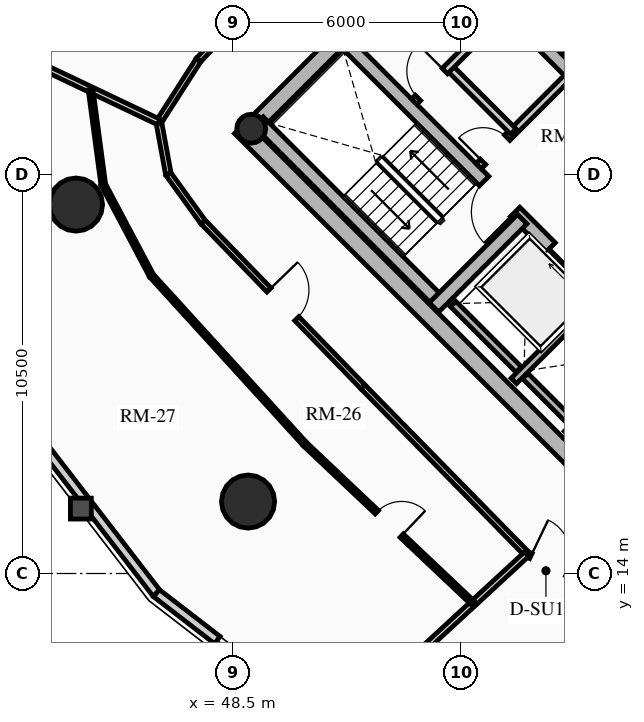
"""IFC4 building model, lengths in metres.
Left out: names, types, materials, properties, quantities, classifications, styles, units other than length and angle.
Written with IfcOpenShell. Run it as: python <this file> out.ifc"""

import sys

from ifc_helpers import new_model, si_unit, direction, frame, frame_2d, origin, origin_2d, place, context, subcontext, project, spatial, rectangle, circle, hollow_circle, extrude, source, transform, mapped, element, fill, save


model = new_model("IFC4")
c1 = context("Model", 3, precision=1e-05, world=origin(), true_north=direction((0.0, 1.0)))
c2 = subcontext(c1, "Body", "Model", "MODEL_VIEW")
j1 = project(units=[si_unit("LENGTHUNIT", "METRE"), si_unit("PLANEANGLEUNIT", "RADIAN")], contexts=[c1])
p1 = place(None, origin())
s1 = spatial("IfcSite", under=j1, at=p1, CompositionType="ELEMENT")
p2 = place(p1, origin())
s2 = spatial("IfcBuilding", under=s1, at=p2, CompositionType="ELEMENT")
p3 = place(p2, frame((0.0, 0.0, 113.8)))
s3 = spatial("IfcBuildingStorey", under=s2, at=p3, CompositionType="ELEMENT", Elevation=113.8)
for number, where, z_axis, x_axis in (
    (1, (58.737, 15.697, 0.0), (0.0, 0.0, 1.0), (-0.707, 0.707, 0.0)),
    (2, (66.303, 23.263, 0.0), (0.0, 0.0, 1.0), (-0.707, 0.707, 0.0)),
):
    element("IfcWall", number, at=place(p3, frame(where, z_axis=z_axis, x_axis=x_axis)), inside=s3, PredefinedType="SHEAR", context=c2, shape_type="SweptSolid", body=[
        extrude(rectangle(XDim=14.2, YDim=0.45, at=frame_2d((7.1, 0.0))), origin(), (0.0, 0.0, 1.0), 2.91),
    ])
p4 = place(p3, frame((48.856, 25.578, 0.0), z_axis=(0.0, 0.0, 1.0), x_axis=(0.707106781187, 0.707106781187, 0.0)))
e3 = element("IfcWall", 3, at=p4, inside=s3, PredefinedType="SHEAR", context=c2, shape_type="SweptSolid", body=[
    extrude(rectangle(XDim=10.7, YDim=0.45, at=frame_2d((5.35, 0.0))), origin(), (0.0, 0.0, 1.0), 2.91),
])
m1 = source(origin(), c2, "Body", "SweptSolid", [
    extrude(rectangle(XDim=1.5, YDim=2.02, at=frame_2d((0.75, 1.01))), frame((0.0, 0.235, 0.0), z_axis=(0.0, -1.0, 0.0), x_axis=(1.0, 0.0, 0.0)), (0.0, 0.0, 1.0), 0.47),
])
p5 = place(p4, frame((4.6, 0.0, 0.0)))
e4 = element("IfcOpeningElement", 4, at=p5, cuts=e3, PredefinedType="OPENING", context=c2, shape_type="MappedRepresentation", body=[
    mapped(m1, transform((0.0, 0.0, 0.0), x_axis=(1.0, 0.0, 0.0), y_axis=(0.0, 1.0, 0.0), z_axis=(0.0, 0.0, 1.0), scale=1.0)),
])
p6 = place(p3, frame((61.078, 18.355, 0.0), z_axis=(0.0, 0.0, 1.0), x_axis=(-0.707106781187, 0.707106781187, 0.0)))
e5 = element("IfcWall", 5, at=p6, inside=s3, PredefinedType="SHEAR", context=c2, shape_type="SweptSolid", body=[
    extrude(rectangle(XDim=13.75, YDim=0.35, at=frame_2d((6.875, 0.0))), origin(), (0.0, 0.0, 1.0), 2.91),
])
m2 = source(origin(), c2, "Body", "SweptSolid", [
    extrude(rectangle(XDim=1.1, YDim=2.015, at=frame_2d((0.55, 1.007))), frame((0.0, 0.185, 0.0), z_axis=(0.0, -1.0, 0.0), x_axis=(1.0, 0.0, 0.0)), (0.0, 0.0, 1.0), 0.37),
])
p7 = place(p6, frame((4.875, 0.0, 0.0)))
e6 = element("IfcOpeningElement", 6, at=p7, cuts=e5, PredefinedType="OPENING", context=c2, shape_type="MappedRepresentation", body=[
    mapped(m2, transform((0.0, 0.0, 0.0), x_axis=(1.0, 0.0, 0.0), y_axis=(0.0, 1.0, 0.0), z_axis=(0.0, 0.0, 1.0), scale=1.0)),
])
m3 = source(origin(), c2, "Body", "SweptSolid", [
    extrude(rectangle(XDim=1.15, YDim=2.02, at=frame_2d((0.575, 1.01))), frame((0.0, 0.185, 0.0), z_axis=(0.0, -1.0, 0.0), x_axis=(1.0, 0.0, 0.0)), (0.0, 0.0, 1.0), 0.37),
])
p8 = place(p6, frame((7.295, 0.0, 0.0)))
e7 = element("IfcOpeningElement", 7, at=p8, cuts=e5, PredefinedType="OPENING", context=c2, shape_type="MappedRepresentation", body=[
    mapped(m3, transform((0.0, 0.0, 0.0), x_axis=(1.0, 0.0, 0.0), y_axis=(0.0, 1.0, 0.0), z_axis=(0.0, 0.0, 1.0), scale=1.0)),
])
p9 = place(p3, frame((63.645, 20.922, 0.0), z_axis=(0.0, 0.0, 1.0), x_axis=(-0.707106781187, 0.707106781187, 0.0)))
e8 = element("IfcWall", 8, at=p9, inside=s3, PredefinedType="SHEAR", context=c2, shape_type="SweptSolid", body=[
    extrude(rectangle(XDim=13.75, YDim=0.35, at=frame_2d((6.875, 0.0))), origin(), (0.0, 0.0, 1.0), 2.91),
])
p10 = place(p9, frame((10.0, 0.0, 0.0)))
e9 = element("IfcOpeningElement", 9, at=p10, cuts=e8, PredefinedType="OPENING", context=c2, shape_type="MappedRepresentation", body=[
    mapped(m2, transform((0.0, 0.0, 0.0), x_axis=(1.0, 0.0, 0.0), y_axis=(0.0, 1.0, 0.0), z_axis=(0.0, 0.0, 1.0), scale=1.0)),
])
p11 = place(p9, frame((12.0, 0.0, 0.0)))
e10 = element("IfcOpeningElement", 10, at=p11, cuts=e8, PredefinedType="OPENING", context=c2, shape_type="MappedRepresentation", body=[
    mapped(m2, transform((0.0, 0.0, 0.0), x_axis=(1.0, 0.0, 0.0), y_axis=(0.0, 1.0, 0.0), z_axis=(0.0, 0.0, 1.0), scale=1.0)),
])
p12 = place(p9, frame((5.305, 0.0, 0.0)))
e11 = element("IfcOpeningElement", 11, at=p12, cuts=e8, PredefinedType="OPENING", context=c2, shape_type="MappedRepresentation", body=[
    mapped(m3, transform((0.0, 0.0, 0.0), x_axis=(1.0, 0.0, 0.0), y_axis=(0.0, 1.0, 0.0), z_axis=(0.0, 0.0, 1.0), scale=1.0)),
])
p13 = place(p3, frame((53.922, 21.141, 0.0), z_axis=(0.0, 0.0, 1.0), x_axis=(-0.707088616009, 0.707124945897, 0.0)))
e12 = element("IfcWall", 12, at=p13, inside=s3, PredefinedType="SHEAR", context=c2, shape_type="SweptSolid", body=[
    extrude(rectangle(XDim=6.72, YDim=0.35, at=frame_2d((3.36, 0.0))), origin(), (0.0, 0.0, 1.0), 2.91),
])
p14 = place(p3, frame((53.784, 21.003, 0.0), z_axis=(0.0, 0.0, 1.0), x_axis=(0.707106781187, 0.707106781187, 0.0)))
e13 = element("IfcWall", 13, at=p14, inside=s3, PredefinedType="SHEAR", context=c2, shape_type="SweptSolid", body=[
    extrude(rectangle(XDim=3.285, YDim=0.35, at=frame_2d((1.643, 0.0))), origin(), (0.0, 0.0, 1.0), 2.91),
])
p15 = place(p3, frame((48.976, 25.706, 0.0), z_axis=(0.0, 0.0, 1.0), x_axis=(0.707106781187, 0.707106781187, 0.0)))
e14 = element("IfcColumn", 14, at=p15, inside=s3, PredefinedType="COLUMN", context=c2, shape_type="SweptSolid", body=[
    extrude(hollow_circle(Radius=0.38, WallThickness=0.032, at=origin_2d()), origin(), (0.0, 0.0, 1.0), 2.91),
])
for number, where, z_axis, x_axis in (
    (15, (44.365, 23.709, 0.0), (0.0, 0.0, 1.0), (1.0, 0.0, 0.0)),
    (16, (48.893, 15.893, 0.0), (0.0, 0.0, 1.0), (1.0, 0.0, 0.0)),
):
    element("IfcColumn", number, at=place(p3, frame(where, z_axis=z_axis, x_axis=x_axis)), inside=s3, PredefinedType="USERDEFINED", context=c2, shape_type="SweptSolid", body=[
        extrude(circle(Radius=0.7, at=origin_2d()), origin(), (0.0, 0.0, 1.0), 2.91),
    ])
p16 = place(p3, frame((46.483, 13.483, 0.0), z_axis=(0.0, 0.0, 1.0), x_axis=(-0.61054437102, 0.791982052206, 0.0)))
e17 = element("IfcWall", 17, at=p16, inside=s3, PredefinedType="SOLIDWALL", context=c2, shape_type="SweptSolid", body=[
    extrude(rectangle(XDim=5.942, YDim=0.24, at=frame_2d((2.971, 0.0))), origin(), (0.0, 0.0, 1.0), 2.179),
])
p17 = place(p3, frame((51.189, 9.855, 0.0), z_axis=(0.0, 0.0, 1.0), x_axis=(-0.791982052206, 0.61054437102, 0.0)))
e18 = element("IfcWall", 18, at=p17, inside=s3, PredefinedType="SOLIDWALL", context=c2, shape_type="SweptSolid", body=[
    extrude(rectangle(XDim=5.942, YDim=0.24, at=frame_2d((2.971, 0.0))), origin(), (0.0, 0.0, 1.0), 2.179),
])
m4 = source(origin(), c2, "Body", "SweptSolid", [
    extrude(rectangle(XDim=1.9, YDim=1.35, at=frame_2d((0.95, 0.675))), frame((0.0, 0.13, 0.0), z_axis=(0.0, -1.0, 0.0), x_axis=(1.0, 0.0, 0.0)), (0.0, 0.0, 1.0), 0.26),
])
p18 = place(p17, frame((2.021, 0.0, 0.65)))
e19 = element("IfcOpeningElement", 19, at=p18, cuts=e18, PredefinedType="OPENING", context=c2, shape_type="MappedRepresentation", body=[
    mapped(m4, transform((0.0, 0.0, 0.0), x_axis=(1.0, 0.0, 0.0), y_axis=(0.0, 1.0, 0.0), z_axis=(0.0, 0.0, 1.0), scale=1.0)),
])
p19 = place(p3, frame((55.888, 19.069, 0.0), z_axis=(0.0, 0.0, 1.0), x_axis=(0.707106781187, 0.707106781187, 0.0)))
e20 = element("IfcWall", 20, at=p19, inside=s3, PredefinedType="SHEAR", context=c2, shape_type="SweptSolid", body=[
    extrude(rectangle(XDim=2.97, YDim=0.2, at=frame_2d((1.485, 0.0))), origin(), (0.0, 0.0, 1.0), 2.91),
])
p20 = place(p3, frame((56.015, 19.366, 0.0), z_axis=(0.0, 0.0, 1.0), x_axis=(-0.707106781187, 0.707106781187, 0.0)))
e21 = element("IfcWall", 21, at=p20, inside=s3, PredefinedType="SHEAR", context=c2, shape_type="SweptSolid", body=[
    extrude(rectangle(XDim=2.44, YDim=0.2, at=frame_2d((1.22, 0.0))), origin(), (0.0, 0.0, 1.0), 2.91),
])
p21 = place(p3, frame((57.284, 17.673, 0.0), z_axis=(0.0, 0.0, 1.0), x_axis=(0.707147878904, 0.70706568108, 0.0)))
e22 = element("IfcWall", 22, at=p21, inside=s3, PredefinedType="SHEAR", context=c2, shape_type="SweptSolid", body=[
    extrude(rectangle(XDim=2.97, YDim=0.2, at=frame_2d((1.485, 0.0))), origin(), (0.0, 0.0, 1.0), 2.91),
])
p22 = place(p3, frame((57.412, 17.97, 0.0), z_axis=(0.0, 0.0, 1.0), x_axis=(-0.707106781187, 0.707106781187, 0.0)))
e23 = element("IfcWall", 23, at=p22, inside=s3, PredefinedType="SHEAR", context=c2, shape_type="SweptSolid", body=[
    extrude(rectangle(XDim=1.735, YDim=0.2, at=frame_2d((0.867, 0.0))), origin(), (0.0, 0.0, 1.0), 2.91),
])
p23 = place(p3, frame((57.062, 27.781, 0.0), z_axis=(0.0, 0.0, 1.0), x_axis=(0.707106781187, 0.707106781187, 0.0)))
e24 = element("IfcWall", 24, at=p23, inside=s3, PredefinedType="SHEAR", context=c2, shape_type="SweptSolid", body=[
    extrude(rectangle(XDim=2.97, YDim=0.2, at=frame_2d((1.485, 0.0))), origin(), (0.0, 0.0, 1.0), 2.91),
])
p24 = place(p3, frame((54.961, 24.719, 0.0), z_axis=(0.0, 0.0, 1.0), x_axis=(0.707106781187, 0.707106781187, 0.0)))
e25 = element("IfcWall", 25, at=p24, inside=s3, PredefinedType="PARTITIONING", context=c2, shape_type="SweptSolid", body=[
    extrude(rectangle(XDim=3.28, YDim=0.2, at=frame_2d((1.64, 0.0))), origin(), (0.0, 0.0, 1.0), 2.655),
])
m5 = source(origin(), c2, "Body", "SweptSolid", [
    extrude(rectangle(XDim=0.9, YDim=2.005, at=frame_2d((0.45, 1.002))), frame((0.0, 0.11, 0.0), z_axis=(0.0, -1.0, 0.0), x_axis=(1.0, 0.0, 0.0)), (0.0, 0.0, 1.0), 0.22),
])
p25 = place(p24, frame((0.16, 0.0, 0.0)))
e26 = element("IfcOpeningElement", 26, at=p25, cuts=e25, PredefinedType="OPENING", context=c2, shape_type="MappedRepresentation", body=[
    mapped(m5, transform((0.0, 0.0, 0.0), x_axis=(1.0, 0.0, 0.0), y_axis=(0.0, 1.0, 0.0), z_axis=(0.0, 0.0, 1.0), scale=1.0)),
])
p26 = place(p3, frame((55.874, 25.631, 0.0), z_axis=(0.0, 0.0, 1.0), x_axis=(-0.707157639372, 0.707055919343, 0.0)))
e27 = element("IfcWall", 27, at=p26, inside=s3, PredefinedType="PARTITIONING", context=c2, shape_type="SweptSolid", body=[
    extrude(rectangle(XDim=2.4, YDim=0.2, at=frame_2d((1.2, 0.0))), origin(), (0.0, 0.0, 1.0), 2.655),
])
p27 = place(p3, frame((53.264, 26.416, 0.0), z_axis=(0.0, 0.0, 1.0), x_axis=(0.707106781187, 0.707106781187, 0.0)))
e28 = element("IfcWall", 28, at=p27, inside=s3, PredefinedType="PARTITIONING", context=c2, shape_type="SweptSolid", body=[
    extrude(rectangle(XDim=3.28, YDim=0.2, at=frame_2d((1.64, 0.0))), origin(), (0.0, 0.0, 1.0), 2.655),
])
m6 = source(origin(), c2, "Body", "SweptSolid", [
    extrude(rectangle(XDim=1.0, YDim=2.015, at=frame_2d((0.5, 1.007))), frame((0.0, 0.11, 0.0), z_axis=(0.0, -1.0, 0.0), x_axis=(1.0, 0.0, 0.0)), (0.0, 0.0, 1.0), 0.22),
])
p28 = place(p27, frame((0.14, 0.0, 0.0)))
e29 = element("IfcOpeningElement", 29, at=p28, cuts=e28, PredefinedType="OPENING", context=c2, shape_type="MappedRepresentation", body=[
    mapped(m6, transform((0.0, 0.0, 0.0), x_axis=(1.0, 0.0, 0.0), y_axis=(0.0, 1.0, 0.0), z_axis=(0.0, 0.0, 1.0), scale=1.0)),
])
p29 = place(p27, frame((2.05, 0.0, 0.0)))
e30 = element("IfcOpeningElement", 30, at=p29, cuts=e28, PredefinedType="OPENING", context=c2, shape_type="MappedRepresentation", body=[
    mapped(m5, transform((0.0, 0.0, 0.0), x_axis=(1.0, 0.0, 0.0), y_axis=(0.0, 1.0, 0.0), z_axis=(0.0, 0.0, 1.0), scale=1.0)),
])
p30 = place(p3, frame((52.043, 32.28, 0.0), z_axis=(0.0, 0.0, 1.0), x_axis=(-0.682606081633, -0.730786519661, 0.0)))
e31 = element("IfcWall", 31, at=p30, inside=s3, PredefinedType="PARTITIONING", context=c2, shape_type="SweptSolid", body=[
    extrude(rectangle(XDim=6.527, YDim=0.15, at=frame_2d((3.263, 0.0))), origin(), (0.0, 0.0, 1.0), 2.225),
])
p31 = place(p3, frame((47.588, 27.51, 0.0), z_axis=(0.0, 0.0, 1.0), x_axis=(-0.540202619347, -0.841534984449, 0.0)))
e32 = element("IfcWall", 32, at=p31, inside=s3, PredefinedType="PARTITIONING", context=c2, shape_type="SweptSolid", body=[
    extrude(rectangle(XDim=1.935, YDim=0.15, at=frame_2d((0.967, 0.0))), origin(), (0.0, 0.0, 1.0), 2.225),
])
p32 = place(p3, frame((46.543, 25.882, 0.0), z_axis=(0.0, 0.0, 1.0), x_axis=(0.181153502579, -0.983454832976, 0.0)))
e33 = element("IfcWall", 33, at=p32, inside=s3, PredefinedType="PARTITIONING", context=c2, shape_type="SweptSolid", body=[
    extrude(rectangle(XDim=1.392, YDim=0.15, at=frame_2d((0.696, 0.0))), origin(), (0.0, 0.0, 1.0), 2.225),
])
p33 = place(p3, frame((46.795, 24.513, 0.0), z_axis=(0.0, 0.0, 1.0), x_axis=(0.585628197524, -0.810579801294, 0.0)))
e34 = element("IfcWall", 34, at=p33, inside=s3, PredefinedType="PARTITIONING", context=c2, shape_type="SweptSolid", body=[
    extrude(rectangle(XDim=1.554, YDim=0.15, at=frame_2d((0.777, 0.0))), origin(), (0.0, 0.0, 1.0), 2.225),
])
p34 = place(p3, frame((47.706, 23.253, 0.0), z_axis=(0.0, 0.0, 1.0), x_axis=(0.696179266346, -0.717867974707, 0.0)))
e35 = element("IfcWall", 35, at=p34, inside=s3, PredefinedType="PARTITIONING", context=c2, shape_type="SweptSolid", body=[
    extrude(rectangle(XDim=6.045, YDim=0.15, at=frame_2d((3.022, 0.0))), origin(), (0.0, 0.0, 1.0), 2.655),
])
m7 = source(origin(), c2, "Body", "SweptSolid", [
    extrude(rectangle(XDim=1.05, YDim=2.015, at=frame_2d((0.525, 1.007))), frame((0.0, 0.085, 0.0), z_axis=(0.0, -1.0, 0.0), x_axis=(1.0, 0.0, 0.0)), (0.0, 0.0, 1.0), 0.17),
])
p35 = place(p34, frame((2.497, 0.0, 0.0)))
e36 = element("IfcOpeningElement", 36, at=p35, cuts=e35, PredefinedType="OPENING", context=c2, shape_type="MappedRepresentation", body=[
    mapped(m7, transform((0.0, 0.0, 0.0), x_axis=(1.0, 0.0, 0.0), y_axis=(0.0, 1.0, 0.0), z_axis=(0.0, 0.0, 1.0), scale=1.0)),
])
p36 = place(p3, frame((51.914, 18.914, 0.0), z_axis=(0.0, 0.0, 1.0), x_axis=(0.699999313799, -0.714143515465, 0.0)))
e37 = element("IfcWall", 37, at=p36, inside=s3, PredefinedType="PARTITIONING", context=c2, shape_type="SweptSolid", body=[
    extrude(rectangle(XDim=6.162, YDim=0.15, at=frame_2d((3.081, 0.0))), origin(), (0.0, 0.0, 1.0), 2.225),
])
p37 = place(p3, frame((56.227, 14.513, 0.0), z_axis=(0.0, 0.0, 1.0), x_axis=(0.901477579283, -0.432825801044, 0.0)))
e38 = element("IfcWall", 38, at=p37, inside=s3, PredefinedType="PARTITIONING", context=c2, shape_type="SweptSolid", body=[
    extrude(rectangle(XDim=1.424, YDim=0.15, at=frame_2d((0.712, 0.0))), origin(), (0.0, 0.0, 1.0), 2.225),
])
p38 = place(p37, frame((0.12, 0.0, 0.0)))
e39 = element("IfcOpeningElement", 39, at=p38, cuts=e38, PredefinedType="OPENING", context=c2, shape_type="MappedRepresentation", body=[
    mapped(m7, transform((0.0, 0.0, 0.0), x_axis=(1.0, 0.0, 0.0), y_axis=(0.0, 1.0, 0.0), z_axis=(0.0, 0.0, 1.0), scale=1.0)),
])
p39 = place(p3, frame((46.543, 25.882, 0.0), z_axis=(0.0, 0.0, 1.0), x_axis=(-0.903054383171, 0.429526228576, 0.0)))
e40 = element("IfcWall", 40, at=p39, inside=s3, PredefinedType="PARTITIONING", context=c2, shape_type="SweptSolid", body=[
    extrude(rectangle(XDim=7.096, YDim=0.16, at=frame_2d((3.548, 0.0))), origin(), (0.0, 0.0, 1.0), 2.179),
])
p40 = place(p3, frame((56.227, 14.513, 0.0), z_axis=(0.0, 0.0, 1.0), x_axis=(-0.734951144322, -0.678120059768, 0.0)))
e41 = element("IfcWall", 41, at=p40, inside=s3, PredefinedType="PARTITIONING", context=c2, shape_type="SweptSolid", body=[
    extrude(rectangle(XDim=6.843, YDim=0.16, at=frame_2d((3.422, 0.0))), origin(), (0.0, 0.0, 1.0), 2.179),
])
p41 = place(p3, frame((44.749, 26.736, 0.0), z_axis=(0.0, 0.0, 1.0), x_axis=(0.132518524874, -0.991180528746, 0.0)))
e42 = element("IfcWall", 42, at=p41, inside=s3, PredefinedType="PARTITIONING", context=c2, shape_type="SweptSolid", body=[
    extrude(rectangle(XDim=2.524, YDim=0.125, at=frame_2d((1.262, 0.0))), origin(), (0.0, 0.0, 1.0), 2.179),
])
p42 = place(p3, frame((45.083, 24.234, 0.0), z_axis=(0.0, 0.0, 1.0), x_axis=(0.468015958378, -0.883720013751, 0.0)))
e43 = element("IfcWall", 43, at=p42, inside=s3, PredefinedType="PARTITIONING", context=c2, shape_type="SweptSolid", body=[
    extrude(rectangle(XDim=2.711, YDim=0.125, at=frame_2d((1.356, 0.0))), origin(), (0.0, 0.0, 1.0), 2.225),
])
p43 = place(p3, frame((46.352, 21.838, 0.0), z_axis=(0.0, 0.0, 1.0), x_axis=(0.673416949194, -0.739262884594, 0.0)))
e44 = element("IfcWall", 44, at=p43, inside=s3, PredefinedType="PARTITIONING", context=c2, shape_type="SweptSolid", body=[
    extrude(rectangle(XDim=6.007, YDim=0.125, at=frame_2d((3.003, 0.0))), origin(), (0.0, 0.0, 1.0), 2.655),
])
p44 = place(p3, frame((50.397, 17.397, 0.0), z_axis=(0.0, 0.0, 1.0), x_axis=(0.726427828833, -0.687242758781, 0.0)))
e45 = element("IfcWall", 45, at=p44, inside=s3, PredefinedType="PARTITIONING", context=c2, shape_type="SweptSolid", body=[
    extrude(rectangle(XDim=6.087, YDim=0.125, at=frame_2d((3.043, 0.0))), origin(), (0.0, 0.0, 1.0), 2.225),
])
m8 = source(origin(), c2, "Body", "SweptSolid", [
    extrude(rectangle(XDim=0.9, YDim=2.005, at=frame_2d((0.45, 1.002))), frame((0.0, 0.073, 0.0), z_axis=(0.0, -1.0, 0.0), x_axis=(1.0, 0.0, 0.0)), (0.0, 0.0, 1.0), 0.145),
])
p45 = place(p44, frame((2.594, 0.0, 0.0)))
e46 = element("IfcOpeningElement", 46, at=p45, cuts=e45, PredefinedType="OPENING", context=c2, shape_type="MappedRepresentation", body=[
    mapped(m8, transform((0.0, 0.0, 0.0), x_axis=(1.0, 0.0, 0.0), y_axis=(0.0, 1.0, 0.0), z_axis=(0.0, 0.0, 1.0), scale=1.0)),
])
m9 = source(origin(), c2, "Body", "SweptSolid", [
    extrude(rectangle(XDim=1.9, YDim=1.35, at=frame_2d((0.95, 0.675))), frame((0.0, 0.03, 0.0), z_axis=(0.0, -1.0, 0.0), x_axis=(1.0, 0.0, 0.0)), (0.0, 0.0, 1.0), 0.06),
])
p46 = place(p18, origin())
e47 = element("IfcWindow", 47, at=p46, inside=s3, PartitioningType="DOUBLE_PANEL_VERTICAL", PredefinedType="WINDOW", context=c2, shape_type="MappedRepresentation", body=[
    mapped(m9, transform((0.0, 0.0, 0.0), x_axis=(1.0, 0.0, 0.0), y_axis=(0.0, 1.0, 0.0), z_axis=(0.0, 0.0, 1.0), scale=1.0)),
])
fill(e19, e47)
m10 = source(origin(), c2, "Body", "SweptSolid", [
    extrude(rectangle(XDim=1.1, YDim=2.015, at=frame_2d((0.55, 1.007))), frame((0.0, 0.025, 0.0), z_axis=(0.0, -1.0, 0.0), x_axis=(1.0, 0.0, 0.0)), (0.0, 0.0, 1.0), 0.05),
])
p47 = place(p7, origin())
e48 = element("IfcDoor", 48, at=p47, inside=s3, OperationType="SLIDING_TO_RIGHT", PredefinedType="DOOR", context=c2, shape_type="MappedRepresentation", body=[
    mapped(m10, transform((0.0, 0.0, 0.0), x_axis=(1.0, 0.0, 0.0), y_axis=(0.0, 1.0, 0.0), z_axis=(0.0, 0.0, 1.0), scale=1.0)),
])
fill(e6, e48)
m11 = source(origin(), c2, "Body", "SweptSolid", [
    extrude(rectangle(XDim=1.15, YDim=2.02, at=frame_2d((0.575, 1.01))), frame((0.0, 0.025, 0.0), z_axis=(0.0, -1.0, 0.0), x_axis=(1.0, 0.0, 0.0)), (0.0, 0.0, 1.0), 0.05),
])
p48 = place(p8, origin())
e49 = element("IfcDoor", 49, at=p48, inside=s3, OperationType="SINGLE_SWING_LEFT", PredefinedType="DOOR", context=c2, shape_type="MappedRepresentation", body=[
    mapped(m11, transform((0.0, 0.0, 0.0), x_axis=(1.0, 0.0, 0.0), y_axis=(0.0, 1.0, 0.0), z_axis=(0.0, 0.0, 1.0), scale=1.0)),
])
fill(e7, e49)
m12 = source(origin(), c2, "Body", "SweptSolid", [
    extrude(rectangle(XDim=0.9, YDim=2.005, at=frame_2d((0.45, 1.002))), frame((0.0, 0.025, 0.0), z_axis=(0.0, -1.0, 0.0), x_axis=(1.0, 0.0, 0.0)), (0.0, 0.0, 1.0), 0.05),
])
p49 = place(p25, origin())
e50 = element("IfcDoor", 50, at=p49, inside=s3, OperationType="SINGLE_SWING_LEFT", PredefinedType="DOOR", context=c2, shape_type="MappedRepresentation", body=[
    mapped(m12, transform((0.0, 0.0, 0.0), x_axis=(1.0, 0.0, 0.0), y_axis=(0.0, 1.0, 0.0), z_axis=(0.0, 0.0, 1.0), scale=1.0)),
])
fill(e26, e50)
m13 = source(origin(), c2, "Body", "SweptSolid", [
    extrude(rectangle(XDim=1.0, YDim=2.015, at=frame_2d((0.5, 1.007))), frame((0.0, 0.025, 0.0), z_axis=(0.0, -1.0, 0.0), x_axis=(1.0, 0.0, 0.0)), (0.0, 0.0, 1.0), 0.05),
])
p50 = place(p28, origin())
e51 = element("IfcDoor", 51, at=p50, inside=s3, OperationType="SINGLE_SWING_RIGHT", PredefinedType="DOOR", context=c2, shape_type="MappedRepresentation", body=[
    mapped(m13, transform((0.0, 0.0, 0.0), x_axis=(1.0, 0.0, 0.0), y_axis=(0.0, 1.0, 0.0), z_axis=(0.0, 0.0, 1.0), scale=1.0)),
])
fill(e29, e51)
m14 = source(origin(), c2, "Body", "SweptSolid", [
    extrude(rectangle(XDim=1.05, YDim=2.015, at=frame_2d((0.525, 1.007))), frame((0.0, 0.025, 0.0), z_axis=(0.0, -1.0, 0.0), x_axis=(1.0, 0.0, 0.0)), (0.0, 0.0, 1.0), 0.05),
])
p51 = place(p35, origin())
e52 = element("IfcDoor", 52, at=p51, inside=s3, OperationType="SINGLE_SWING_LEFT", PredefinedType="DOOR", context=c2, shape_type="MappedRepresentation", body=[
    mapped(m14, transform((0.0, 0.0, 0.0), x_axis=(1.0, 0.0, 0.0), y_axis=(0.0, 1.0, 0.0), z_axis=(0.0, 0.0, 1.0), scale=1.0)),
])
fill(e36, e52)
p52 = place(p45, origin())
e53 = element("IfcDoor", 53, at=p52, inside=s3, OperationType="SINGLE_SWING_RIGHT", PredefinedType="DOOR", context=c2, shape_type="MappedRepresentation", body=[
    mapped(m12, transform((0.0, 0.0, 0.0), x_axis=(1.0, 0.0, 0.0), y_axis=(0.0, 1.0, 0.0), z_axis=(0.0, 0.0, 1.0), scale=1.0)),
])
fill(e46, e53)
p53 = place(p38, origin())
e54 = element("IfcDoor", 54, at=p53, inside=s3, OperationType="SINGLE_SWING_LEFT", PredefinedType="DOOR", context=c2, shape_type="MappedRepresentation", body=[
    mapped(m14, transform((0.0, 0.0, 0.0), x_axis=(1.0, 0.0, 0.0), y_axis=(0.0, 1.0, 0.0), z_axis=(0.0, 0.0, 1.0), scale=1.0)),
])
fill(e39, e54)
save(model, sys.argv[1])
